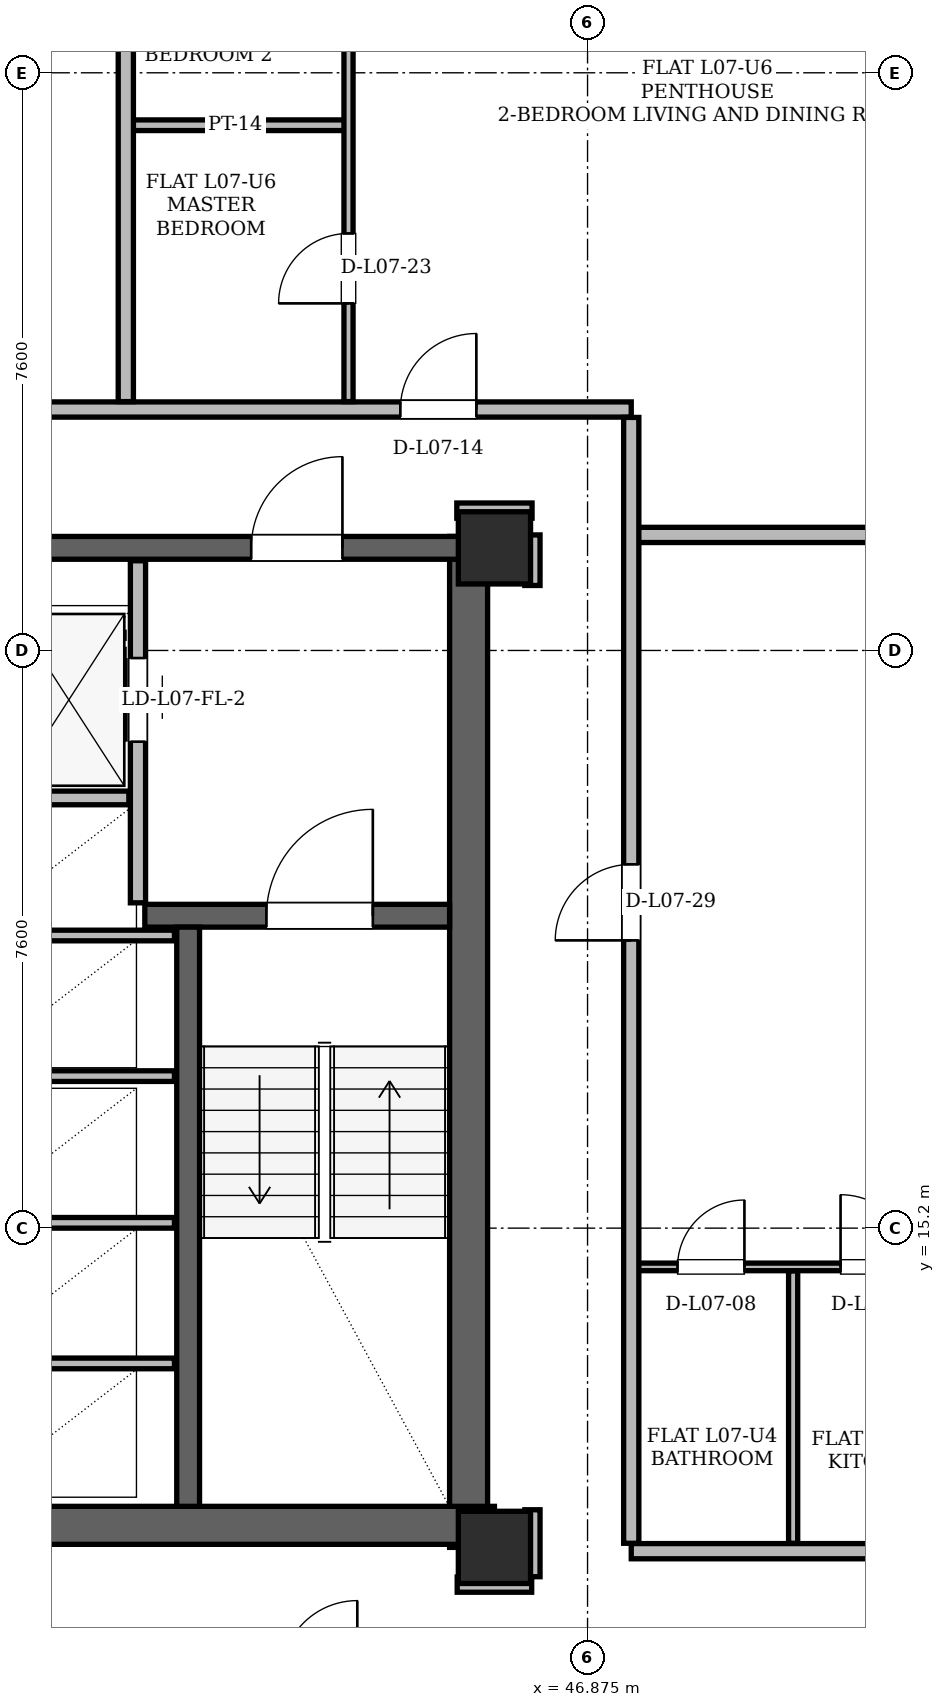
"""IFC4 building model, lengths in metres.
Left out: names, types, materials, properties, quantities, classifications, styles, units other than length and angle.
Written with IfcOpenShell. Run it as: python <this file> out.ifc"""

import sys

from ifc_helpers import new_model, si_unit, direction, frame, frame_2d, origin, origin_2d, place, context, subcontext, project, spatial, rectangle, hollow_rectangle, extrude, element, fill, save


model = new_model("IFC4")
c1 = context("Model", 3, precision=1e-05, world=origin(), true_north=direction((0.0, 1.0)))
c2 = subcontext(c1, "Body", "Model", "MODEL_VIEW")
j1 = project(units=[si_unit("LENGTHUNIT", "METRE"), si_unit("PLANEANGLEUNIT", "RADIAN")], contexts=[c1])
p1 = place(None, origin())
s1 = spatial("IfcSite", under=j1, at=p1, CompositionType="ELEMENT")
p2 = place(p1, origin())
s2 = spatial("IfcBuilding", under=s1, at=p2, CompositionType="ELEMENT")
p3 = place(p2, frame((0.0, 0.0, 30.9)))
s3 = spatial("IfcBuildingStorey", under=s2, at=p3, CompositionType="ELEMENT", Elevation=30.9)
for number, where, z_axis, x_axis in (
    (1, (45.65, 11.0, 0.0), (0.0, 0.0, 1.0), (1.0, 0.0, 0.0)),
    (2, (45.65, 24.15, 0.0), (0.0, 0.0, 1.0), (1.0, 0.0, 0.0)),
):
    element("IfcColumn", number, at=place(p3, frame(where, z_axis=z_axis, x_axis=x_axis)), inside=s3, PredefinedType="COLUMN", context=c2, shape_type="SweptSolid", body=[
        extrude(hollow_rectangle(XDim=0.95, YDim=0.95, WallThickness=0.08, at=origin_2d()), origin(), (0.0, 0.0, 1.0), 3.6),
    ])
p4 = place(p3, frame((45.31, 11.0, 0.0), z_axis=(0.0, 0.0, 1.0), x_axis=(0.0, 1.0, 0.0)))
e3 = element("IfcWall", 3, at=p4, inside=s3, PredefinedType="SHEAR", context=c2, shape_type="SweptSolid", body=[
    extrude(rectangle(XDim=13.3, YDim=0.5, at=frame_2d((6.65, 0.0))), origin(), (0.0, 0.0, 1.0), 3.36),
])
p5 = place(p3, frame((38.55, 11.29, 0.0), z_axis=(0.0, 0.0, 1.0), x_axis=(1.0, 0.0, 0.0)))
e4 = element("IfcWall", 4, at=p5, inside=s3, PredefinedType="SHEAR", context=c2, shape_type="SweptSolid", body=[
    extrude(rectangle(XDim=7.1, YDim=0.5, at=frame_2d((3.55, 0.0))), origin(), (0.0, 0.0, 1.0), 3.36),
])
p6 = place(p3, frame((29.65, 24.15, 0.0), z_axis=(0.0, 0.0, 1.0), x_axis=(1.0, 0.0, 0.0)))
e5 = element("IfcWall", 5, at=p6, inside=s3, PredefinedType="SHEAR", context=c2, shape_type="SweptSolid", body=[
    extrude(rectangle(XDim=15.7, YDim=0.3, at=frame_2d((7.85, 0.0))), origin(), (0.0, 0.0, 1.0), 3.36),
])
p7 = place(p6, frame((1.7, 0.0, 0.0)))
e6 = element("IfcOpeningElement", 6, at=p7, cuts=e5, PredefinedType="OPENING", context=c2, shape_type="SweptSolid", body=[
    extrude(rectangle(XDim=1.2, YDim=2.2, at=frame_2d((0.6, 1.1))), frame((0.0, 0.15, 0.0), z_axis=(0.0, -1.0, 0.0), x_axis=(1.0, 0.0, 0.0)), (0.0, 0.0, 1.0), 0.3),
])
p8 = place(p6, frame((12.8, 0.0, 0.0)))
e7 = element("IfcOpeningElement", 7, at=p8, cuts=e5, PredefinedType="OPENING", context=c2, shape_type="SweptSolid", body=[
    extrude(rectangle(XDim=1.2, YDim=2.2, at=frame_2d((0.6, 1.1))), frame((0.0, 0.15, 0.0), z_axis=(0.0, -1.0, 0.0), x_axis=(1.0, 0.0, 0.0)), (0.0, 0.0, 1.0), 0.3),
])
p9 = place(p6, frame((6.55, 0.0, 0.0)))
e8 = element("IfcOpeningElement", 8, at=p9, cuts=e5, PredefinedType="OPENING", context=c2, shape_type="SweptSolid", body=[
    extrude(rectangle(XDim=0.9, YDim=2.05, at=frame_2d((0.45, 1.025))), frame((0.0, 0.15, 0.0), z_axis=(0.0, -1.0, 0.0), x_axis=(1.0, 0.0, 0.0)), (0.0, 0.0, 1.0), 0.3),
])
p10 = place(p6, frame((8.45, 0.0, 0.0)))
e9 = element("IfcOpeningElement", 9, at=p10, cuts=e5, PredefinedType="OPENING", context=c2, shape_type="SweptSolid", body=[
    extrude(rectangle(XDim=0.9, YDim=2.05, at=frame_2d((0.45, 1.025))), frame((0.0, 0.15, 0.0), z_axis=(0.0, -1.0, 0.0), x_axis=(1.0, 0.0, 0.0)), (0.0, 0.0, 1.0), 0.3),
])
p11 = place(p3, frame((41.05, 19.31, 0.0), z_axis=(0.0, 0.0, 1.0), x_axis=(1.0, 0.0, 0.0)))
e10 = element("IfcWall", 10, at=p11, inside=s3, PredefinedType="SHEAR", context=c2, shape_type="SweptSolid", body=[
    extrude(rectangle(XDim=4.01, YDim=0.3, at=frame_2d((2.005, 0.0))), origin(), (0.0, 0.0, 1.0), 3.36),
])
p12 = place(p11, frame((1.6, 0.0, 0.0)))
e11 = element("IfcOpeningElement", 11, at=p12, cuts=e10, PredefinedType="OPENING", context=c2, shape_type="SweptSolid", body=[
    extrude(rectangle(XDim=1.4, YDim=2.2, at=frame_2d((0.7, 1.1))), frame((0.0, 0.15, 0.0), z_axis=(0.0, -1.0, 0.0), x_axis=(1.0, 0.0, 0.0)), (0.0, 0.0, 1.0), 0.3),
])
p13 = place(p3, frame((41.62, 11.54, 0.0), z_axis=(0.0, 0.0, 1.0), x_axis=(0.0, 1.0, 0.0)))
e12 = element("IfcWall", 12, at=p13, inside=s3, PredefinedType="SHEAR", context=c2, shape_type="SweptSolid", body=[
    extrude(rectangle(XDim=7.62, YDim=0.3, at=frame_2d((3.81, 0.0))), origin(), (0.0, 0.0, 1.0), 3.36),
])
p14 = place(p3, frame((61.844, 15.204, 0.0), z_axis=(0.0, 0.0, 1.0), x_axis=(-0.500000372107, 0.866025188948, 0.0)))
e13 = element("IfcWall", 13, at=p14, inside=s3, PredefinedType="SOLIDWALL", context=c2, shape_type="SweptSolid", body=[
    extrude(rectangle(XDim=32.825, YDim=0.34, at=frame_2d((16.412, 0.0))), origin(), (0.0, 0.0, 1.0), 2.494),
])
p15 = place(p14, frame((6.159, 0.0, 0.0)))
e14 = element("IfcOpeningElement", 14, at=p15, cuts=e13, PredefinedType="OPENING", context=c2, shape_type="SweptSolid", body=[
    extrude(rectangle(XDim=1.5, YDim=2.2, at=frame_2d((0.75, 1.1))), frame((0.0, 0.17, 0.0), z_axis=(0.0, -1.0, 0.0), x_axis=(1.0, 0.0, 0.0)), (0.0, 0.0, 1.0), 0.34),
])
p16 = place(p14, frame((23.92, 0.0, 0.0)))
e15 = element("IfcOpeningElement", 15, at=p16, cuts=e13, PredefinedType="OPENING", context=c2, shape_type="SweptSolid", body=[
    extrude(rectangle(XDim=1.5, YDim=2.2, at=frame_2d((0.75, 1.1))), frame((0.0, 0.17, 0.0), z_axis=(0.0, -1.0, 0.0), x_axis=(1.0, 0.0, 0.0)), (0.0, 0.0, 1.0), 0.34),
])
p17 = place(p14, frame((2.18, 0.0, 0.85)))
e16 = element("IfcOpeningElement", 16, at=p17, cuts=e13, PredefinedType="OPENING", context=c2, shape_type="SweptSolid", body=[
    extrude(rectangle(XDim=2.2, YDim=1.534, at=frame_2d((1.1, 0.767))), frame((0.0, 0.17, 0.0), z_axis=(0.0, -1.0, 0.0), x_axis=(1.0, 0.0, 0.0)), (0.0, 0.0, 1.0), 0.34),
])
p18 = place(p14, frame((13.961, 0.0, 0.85)))
e17 = element("IfcOpeningElement", 17, at=p18, cuts=e13, PredefinedType="OPENING", context=c2, shape_type="SweptSolid", body=[
    extrude(rectangle(XDim=2.0, YDim=1.534, at=frame_2d((1.0, 0.767))), frame((0.0, 0.17, 0.0), z_axis=(0.0, -1.0, 0.0), x_axis=(1.0, 0.0, 0.0)), (0.0, 0.0, 1.0), 0.34),
])
p19 = place(p14, frame((28.489, 0.0, 0.85)))
e18 = element("IfcOpeningElement", 18, at=p19, cuts=e13, PredefinedType="OPENING", context=c2, shape_type="SweptSolid", body=[
    extrude(rectangle(XDim=1.4, YDim=1.534, at=frame_2d((0.7, 0.767))), frame((0.0, 0.17, 0.0), z_axis=(0.0, -1.0, 0.0), x_axis=(1.0, 0.0, 0.0)), (0.0, 0.0, 1.0), 0.34),
])
p20 = place(p3, frame((40.96, 19.48, 0.0), z_axis=(0.0, 0.0, 1.0), x_axis=(0.0, 1.0, 0.0)))
e19 = element("IfcWall", 19, at=p20, inside=s3, PredefinedType="PARTITIONING", context=c2, shape_type="SweptSolid", body=[
    extrude(rectangle(XDim=4.5, YDim=0.2, at=frame_2d((2.25, 0.0))), origin(), (0.0, 0.0, 1.0), 2.4),
])
p21 = place(p20, frame((2.12, 0.0, 0.0)))
e20 = element("IfcOpeningElement", 20, at=p21, cuts=e19, PredefinedType="OPENING", context=c2, shape_type="SweptSolid", body=[
    extrude(rectangle(XDim=1.1, YDim=2.2, at=frame_2d((0.55, 1.1))), frame((0.0, 0.1, 0.0), z_axis=(0.0, -1.0, 0.0), x_axis=(1.0, 0.0, 0.0)), (0.0, 0.0, 1.0), 0.2),
])
p22 = place(p3, frame((39.26, 20.86, 0.0), z_axis=(0.0, 0.0, 1.0), x_axis=(1.0, 0.0, 0.0)))
e21 = element("IfcWall", 21, at=p22, inside=s3, PredefinedType="PARTITIONING", context=c2, shape_type="SweptSolid", body=[
    extrude(rectangle(XDim=1.58, YDim=0.18, at=frame_2d((0.79, 0.0))), origin(), (0.0, 0.0, 1.0), 3.36),
])
for number, where, z_axis, x_axis in (
    (22, (38.78, 13.42, 0.0), (0.0, 0.0, 1.0), (1.0, 0.0, 0.0)),
    (23, (38.78, 15.27, 0.0), (0.0, 0.0, 1.0), (1.0, 0.0, 0.0)),
    (24, (38.78, 17.2, 0.0), (0.0, 0.0, 1.0), (1.0, 0.0, 0.0)),
    (25, (38.78, 19.05, 0.0), (0.0, 0.0, 1.0), (1.0, 0.0, 0.0)),
):
    element("IfcWall", number, at=place(p3, frame(where, z_axis=z_axis, x_axis=x_axis)), inside=s3, PredefinedType="PARTITIONING", context=c2, shape_type="SweptSolid", body=[
        extrude(rectangle(XDim=2.66, YDim=0.14, at=frame_2d((1.33, 0.0))), origin(), (0.0, 0.0, 1.0), 3.36),
    ])
p23 = place(p3, frame((45.16, 10.51, 0.0), z_axis=(0.0, 0.0, 1.0), x_axis=(1.0, 0.0, 0.0)))
e26 = element("IfcWall", 26, at=p23, inside=s3, PredefinedType="PARTITIONING", context=c2, shape_type="SweptSolid", body=[
    extrude(rectangle(XDim=0.98, YDim=0.2, at=frame_2d((0.49, 0.0))), origin(), (0.0, 0.0, 1.0), 2.738),
])
p24 = place(p3, frame((47.45, 10.95, 0.0), z_axis=(0.0, 0.0, 1.0), x_axis=(1.0, 0.0, 0.0)))
e27 = element("IfcWall", 27, at=p24, inside=s3, PredefinedType="PARTITIONING", context=c2, shape_type="SweptSolid", body=[
    extrude(rectangle(XDim=11.737, YDim=0.2, at=frame_2d((5.869, 0.0))), origin(), (0.0, 0.0, 1.0), 3.36),
])
p25 = place(p3, frame((47.4, 14.69, 0.0), z_axis=(0.0, 0.0, 1.0), x_axis=(1.0, 0.0, 0.0)))
e28 = element("IfcWall", 28, at=p25, inside=s3, PredefinedType="PARTITIONING", context=c2, shape_type="SweptSolid", body=[
    extrude(rectangle(XDim=13.947, YDim=0.1, at=frame_2d((6.973, 0.0))), origin(), (0.0, 0.0, 1.0), 2.738),
])
p26 = place(p25, frame((0.659, 0.0, 0.0)))
e29 = element("IfcOpeningElement", 29, at=p26, cuts=e28, PredefinedType="OPENING", context=c2, shape_type="SweptSolid", body=[
    extrude(rectangle(XDim=0.88, YDim=2.08, at=frame_2d((0.44, 1.04))), frame((0.0, 0.05, 0.0), z_axis=(0.0, -1.0, 0.0), x_axis=(1.0, 0.0, 0.0)), (0.0, 0.0, 1.0), 0.1),
])
p27 = place(p25, frame((2.804, 0.0, 0.0)))
e30 = element("IfcOpeningElement", 30, at=p27, cuts=e28, PredefinedType="OPENING", context=c2, shape_type="SweptSolid", body=[
    extrude(rectangle(XDim=0.95, YDim=2.1, at=frame_2d((0.475, 1.05))), frame((0.0, 0.05, 0.0), z_axis=(0.0, -1.0, 0.0), x_axis=(1.0, 0.0, 0.0)), (0.0, 0.0, 1.0), 0.1),
])
p28 = place(p25, frame((5.926, 0.0, 0.0)))
e31 = element("IfcOpeningElement", 31, at=p28, cuts=e28, PredefinedType="OPENING", context=c2, shape_type="SweptSolid", body=[
    extrude(rectangle(XDim=0.95, YDim=2.1, at=frame_2d((0.475, 1.05))), frame((0.0, 0.05, 0.0), z_axis=(0.0, -1.0, 0.0), x_axis=(1.0, 0.0, 0.0)), (0.0, 0.0, 1.0), 0.1),
])
p29 = place(p25, frame((10.754, 0.0, 0.0)))
e32 = element("IfcOpeningElement", 32, at=p29, cuts=e28, PredefinedType="OPENING", context=c2, shape_type="SweptSolid", body=[
    extrude(rectangle(XDim=0.92, YDim=2.12, at=frame_2d((0.46, 1.06))), frame((0.0, 0.05, 0.0), z_axis=(0.0, -1.0, 0.0), x_axis=(1.0, 0.0, 0.0)), (0.0, 0.0, 1.0), 0.1),
])
p30 = place(p3, frame((47.45, 24.32, 0.0), z_axis=(0.0, 0.0, 1.0), x_axis=(1.0, 0.0, 0.0)))
e33 = element("IfcWall", 33, at=p30, inside=s3, PredefinedType="PARTITIONING", context=c2, shape_type="SweptSolid", body=[
    extrude(rectangle(XDim=8.93, YDim=0.2, at=frame_2d((4.465, 0.0))), origin(), (0.0, 0.0, 1.0), 2.494),
])
p31 = place(p3, frame((45.155, 24.64, 0.0), z_axis=(0.0, 0.0, 1.0), x_axis=(1.0, 0.0, 0.0)))
e34 = element("IfcWall", 34, at=p31, inside=s3, PredefinedType="PARTITIONING", context=c2, shape_type="SweptSolid", body=[
    extrude(rectangle(XDim=0.99, YDim=0.2, at=frame_2d((0.495, 0.0))), origin(), (0.0, 0.0, 1.0), 2.738),
])
p32 = place(p3, frame((27.55, 25.97, 0.0), z_axis=(0.0, 0.0, 1.0), x_axis=(1.0, 0.0, 0.0)))
e35 = element("IfcWall", 35, at=p32, inside=s3, PredefinedType="PARTITIONING", context=c2, shape_type="SweptSolid", body=[
    extrude(rectangle(XDim=19.9, YDim=0.2, at=frame_2d((9.95, 0.0))), origin(), (0.0, 0.0, 1.0), 2.738),
])
p33 = place(p32, frame((2.619, 0.0, 0.0)))
e36 = element("IfcOpeningElement", 36, at=p33, cuts=e35, PredefinedType="OPENING", context=c2, shape_type="SweptSolid", body=[
    extrude(rectangle(XDim=1.0, YDim=2.18, at=frame_2d((0.5, 1.09))), frame((0.0, 0.1, 0.0), z_axis=(0.0, -1.0, 0.0), x_axis=(1.0, 0.0, 0.0)), (0.0, 0.0, 1.0), 0.2),
])
p34 = place(p32, frame((7.8, 0.0, 0.0)))
e37 = element("IfcOpeningElement", 37, at=p34, cuts=e35, PredefinedType="OPENING", context=c2, shape_type="SweptSolid", body=[
    extrude(rectangle(XDim=1.3, YDim=2.2, at=frame_2d((0.65, 1.1))), frame((0.0, 0.1, 0.0), z_axis=(0.0, -1.0, 0.0), x_axis=(1.0, 0.0, 0.0)), (0.0, 0.0, 1.0), 0.2),
])
p35 = place(p32, frame((16.862, 0.0, 0.0)))
e38 = element("IfcOpeningElement", 38, at=p35, cuts=e35, PredefinedType="OPENING", context=c2, shape_type="SweptSolid", body=[
    extrude(rectangle(XDim=1.0, YDim=2.18, at=frame_2d((0.5, 1.09))), frame((0.0, 0.1, 0.0), z_axis=(0.0, -1.0, 0.0), x_axis=(1.0, 0.0, 0.0)), (0.0, 0.0, 1.0), 0.2),
])
p36 = place(p3, frame((40.75, 29.71, 0.0), z_axis=(0.0, 0.0, 1.0), x_axis=(1.0, 0.0, 0.0)))
e39 = element("IfcWall", 39, at=p36, inside=s3, PredefinedType="PARTITIONING", context=c2, shape_type="SweptSolid", body=[
    extrude(rectangle(XDim=2.98, YDim=0.14, at=frame_2d((1.49, 0.0))), origin(), (0.0, 0.0, 1.0), 3.36),
])
p37 = place(p3, frame((40.8, 26.074, 0.0), z_axis=(0.0, 0.0, 1.0), x_axis=(0.0, 1.0, 0.0)))
e40 = element("IfcWall", 40, at=p37, inside=s3, PredefinedType="PARTITIONING", context=c2, shape_type="SweptSolid", body=[
    extrude(rectangle(XDim=17.383, YDim=0.2, at=frame_2d((8.691, 0.0))), origin(), (0.0, 0.0, 1.0), 3.36),
])
p38 = place(p3, frame((43.73, 26.074, 0.0), z_axis=(0.0, 0.0, 1.0), x_axis=(0.0, 1.0, 0.0)))
e41 = element("IfcWall", 41, at=p38, inside=s3, PredefinedType="PARTITIONING", context=c2, shape_type="SweptSolid", body=[
    extrude(rectangle(XDim=17.383, YDim=0.12, at=frame_2d((8.691, 0.0))), origin(), (0.0, 0.0, 1.0), 3.36),
])
p39 = place(p38, frame((1.292, 0.0, 0.0)))
e42 = element("IfcOpeningElement", 42, at=p39, cuts=e41, PredefinedType="OPENING", context=c2, shape_type="SweptSolid", body=[
    extrude(rectangle(XDim=0.92, YDim=2.12, at=frame_2d((0.46, 1.06))), frame((0.0, 0.06, 0.0), z_axis=(0.0, -1.0, 0.0), x_axis=(1.0, 0.0, 0.0)), (0.0, 0.0, 1.0), 0.12),
])
p40 = place(p38, frame((4.939, 0.0, 0.0)))
e43 = element("IfcOpeningElement", 43, at=p40, cuts=e41, PredefinedType="OPENING", context=c2, shape_type="SweptSolid", body=[
    extrude(rectangle(XDim=0.92, YDim=2.12, at=frame_2d((0.46, 1.06))), frame((0.0, 0.06, 0.0), z_axis=(0.0, -1.0, 0.0), x_axis=(1.0, 0.0, 0.0)), (0.0, 0.0, 1.0), 0.12),
])
p41 = place(p38, frame((8.068, 0.0, 0.0)))
e44 = element("IfcOpeningElement", 44, at=p41, cuts=e41, PredefinedType="OPENING", context=c2, shape_type="SweptSolid", body=[
    extrude(rectangle(XDim=0.95, YDim=2.1, at=frame_2d((0.475, 1.05))), frame((0.0, 0.06, 0.0), z_axis=(0.0, -1.0, 0.0), x_axis=(1.0, 0.0, 0.0)), (0.0, 0.0, 1.0), 0.12),
])
p42 = place(p38, frame((10.709, 0.0, 0.0)))
e45 = element("IfcOpeningElement", 45, at=p42, cuts=e41, PredefinedType="OPENING", context=c2, shape_type="SweptSolid", body=[
    extrude(rectangle(XDim=0.95, YDim=2.1, at=frame_2d((0.475, 1.05))), frame((0.0, 0.06, 0.0), z_axis=(0.0, -1.0, 0.0), x_axis=(1.0, 0.0, 0.0)), (0.0, 0.0, 1.0), 0.12),
])
p43 = place(p38, frame((13.491, 0.0, 0.0)))
e46 = element("IfcOpeningElement", 46, at=p43, cuts=e41, PredefinedType="OPENING", context=c2, shape_type="SweptSolid", body=[
    extrude(rectangle(XDim=0.95, YDim=2.1, at=frame_2d((0.475, 1.05))), frame((0.0, 0.06, 0.0), z_axis=(0.0, -1.0, 0.0), x_axis=(1.0, 0.0, 0.0)), (0.0, 0.0, 1.0), 0.12),
])
p44 = place(p38, frame((15.848, 0.0, 0.0)))
e47 = element("IfcOpeningElement", 47, at=p44, cuts=e41, PredefinedType="OPENING", context=c2, shape_type="SweptSolid", body=[
    extrude(rectangle(XDim=0.88, YDim=2.08, at=frame_2d((0.44, 1.04))), frame((0.0, 0.06, 0.0), z_axis=(0.0, -1.0, 0.0), x_axis=(1.0, 0.0, 0.0)), (0.0, 0.0, 1.0), 0.12),
])
p45 = place(p3, frame((46.15, 10.614, 0.0), z_axis=(0.0, 0.0, 1.0), x_axis=(0.0, 1.0, 0.0)))
e48 = element("IfcWall", 48, at=p45, inside=s3, PredefinedType="PARTITIONING", context=c2, shape_type="SweptSolid", body=[
    extrude(rectangle(XDim=0.881, YDim=0.2, at=frame_2d((0.44, 0.0))), origin(), (0.0, 0.0, 1.0), 2.738),
])
p46 = place(p3, frame((46.15, 23.655, 0.0), z_axis=(0.0, 0.0, 1.0), x_axis=(0.0, 1.0, 0.0)))
e49 = element("IfcWall", 49, at=p46, inside=s3, PredefinedType="PARTITIONING", context=c2, shape_type="SweptSolid", body=[
    extrude(rectangle(XDim=0.665, YDim=0.2, at=frame_2d((0.333, 0.0))), origin(), (0.0, 0.0, 1.0), 3.36),
])
p47 = place(p3, frame((47.45, 11.054, 0.0), z_axis=(0.0, 0.0, 1.0), x_axis=(0.0, 1.0, 0.0)))
e50 = element("IfcWall", 50, at=p47, inside=s3, PredefinedType="PARTITIONING", context=c2, shape_type="SweptSolid", body=[
    extrude(rectangle(XDim=14.812, YDim=0.2, at=frame_2d((7.406, 0.0))), origin(), (0.0, 0.0, 1.0), 2.738),
])
p48 = place(p47, frame((7.932, 0.0, 0.0)))
e51 = element("IfcOpeningElement", 51, at=p48, cuts=e50, PredefinedType="OPENING", context=c2, shape_type="SweptSolid", body=[
    extrude(rectangle(XDim=1.0, YDim=2.18, at=frame_2d((0.5, 1.09))), frame((0.0, 0.1, 0.0), z_axis=(0.0, -1.0, 0.0), x_axis=(1.0, 0.0, 0.0)), (0.0, 0.0, 1.0), 0.2),
])
p49 = place(p3, frame((49.58, 11.054, 0.0), z_axis=(0.0, 0.0, 1.0), x_axis=(0.0, 1.0, 0.0)))
e52 = element("IfcWall", 52, at=p49, inside=s3, PredefinedType="PARTITIONING", context=c2, shape_type="SweptSolid", body=[
    extrude(rectangle(XDim=3.582, YDim=0.12, at=frame_2d((1.791, 0.0))), origin(), (0.0, 0.0, 1.0), 2.738),
])
p50 = place(p21, origin())
e53 = element("IfcDoor", 53, at=p50, inside=s3, OperationType="SLIDING_TO_RIGHT", PredefinedType="DOOR", context=c2, shape_type="SweptSolid", body=[
    extrude(rectangle(XDim=1.1, YDim=2.2, at=frame_2d((0.55, 1.1))), frame((0.0, 0.025, 0.0), z_axis=(0.0, -1.0, 0.0), x_axis=(1.0, 0.0, 0.0)), (0.0, 0.0, 1.0), 0.05),
])
fill(e20, e53)
p51 = place(p12, origin())
e54 = element("IfcDoor", 54, at=p51, inside=s3, OperationType="SINGLE_SWING_RIGHT", PredefinedType="DOOR", context=c2, shape_type="SweptSolid", body=[
    extrude(rectangle(XDim=1.4, YDim=2.2, at=frame_2d((0.7, 1.1))), frame((0.0, 0.025, 0.0), z_axis=(0.0, -1.0, 0.0), x_axis=(1.0, 0.0, 0.0)), (0.0, 0.0, 1.0), 0.05),
])
fill(e11, e54)
p52 = place(p8, origin())
e55 = element("IfcDoor", 55, at=p52, inside=s3, OperationType="SINGLE_SWING_RIGHT", PredefinedType="DOOR", context=c2, shape_type="SweptSolid", body=[
    extrude(rectangle(XDim=1.2, YDim=2.2, at=frame_2d((0.6, 1.1))), frame((0.0, 0.025, 0.0), z_axis=(0.0, -1.0, 0.0), x_axis=(1.0, 0.0, 0.0)), (0.0, 0.0, 1.0), 0.05),
])
fill(e7, e55)
p53 = place(p26, origin())
e56 = element("IfcDoor", 56, at=p53, inside=s3, OperationType="SINGLE_SWING_RIGHT", PredefinedType="DOOR", context=c2, shape_type="SweptSolid", body=[
    extrude(rectangle(XDim=0.88, YDim=2.08, at=frame_2d((0.44, 1.04))), frame((0.0, 0.025, 0.0), z_axis=(0.0, -1.0, 0.0), x_axis=(1.0, 0.0, 0.0)), (0.0, 0.0, 1.0), 0.05),
])
fill(e29, e56)
p54 = place(p27, origin())
e57 = element("IfcDoor", 57, at=p54, inside=s3, OperationType="SINGLE_SWING_LEFT", PredefinedType="DOOR", context=c2, shape_type="SweptSolid", body=[
    extrude(rectangle(XDim=0.95, YDim=2.1, at=frame_2d((0.475, 1.05))), frame((0.0, 0.025, 0.0), z_axis=(0.0, -1.0, 0.0), x_axis=(1.0, 0.0, 0.0)), (0.0, 0.0, 1.0), 0.05),
])
fill(e30, e57)
p55 = place(p35, origin())
e58 = element("IfcDoor", 58, at=p55, inside=s3, OperationType="SINGLE_SWING_RIGHT", PredefinedType="DOOR", context=c2, shape_type="SweptSolid", body=[
    extrude(rectangle(XDim=1.0, YDim=2.18, at=frame_2d((0.5, 1.09))), frame((0.0, 0.025, 0.0), z_axis=(0.0, -1.0, 0.0), x_axis=(1.0, 0.0, 0.0)), (0.0, 0.0, 1.0), 0.05),
])
fill(e38, e58)
p56 = place(p39, origin())
e59 = element("IfcDoor", 59, at=p56, inside=s3, OperationType="SINGLE_SWING_LEFT", PredefinedType="DOOR", context=c2, shape_type="SweptSolid", body=[
    extrude(rectangle(XDim=0.92, YDim=2.12, at=frame_2d((0.46, 1.06))), frame((0.0, 0.025, 0.0), z_axis=(0.0, -1.0, 0.0), x_axis=(1.0, 0.0, 0.0)), (0.0, 0.0, 1.0), 0.05),
])
fill(e42, e59)
p57 = place(p48, origin())
e60 = element("IfcDoor", 60, at=p57, inside=s3, OperationType="SINGLE_SWING_LEFT", PredefinedType="DOOR", context=c2, shape_type="SweptSolid", body=[
    extrude(rectangle(XDim=1.0, YDim=2.18, at=frame_2d((0.5, 1.09))), frame((0.0, 0.025, 0.0), z_axis=(0.0, -1.0, 0.0), x_axis=(1.0, 0.0, 0.0)), (0.0, 0.0, 1.0), 0.05),
])
fill(e51, e60)
save(model, sys.argv[1])
